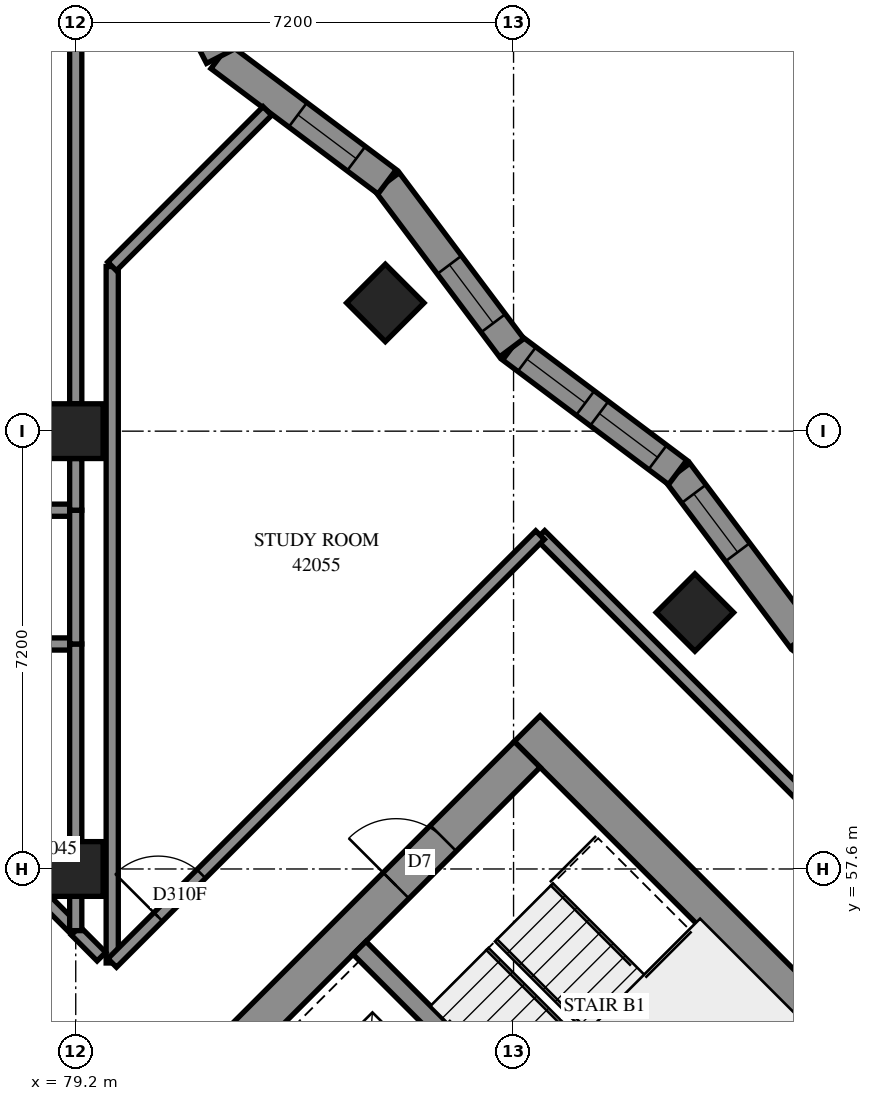
"""IFC4 building model, lengths in metres.
Left out: names, types, materials, properties, quantities, classifications, styles, units other than length and angle.
Written with IfcOpenShell. Run it as: python <this file> out.ifc"""

import sys

from ifc_helpers import new_model, si_unit, direction, frame, frame_2d, origin, origin_2d, place, context, subcontext, project, spatial, polyline, rectangle, outline, extrude, element, fill, save


model = new_model("IFC4")
c1 = context("Model", 3, precision=1e-05, world=origin(), true_north=direction((0.0, 1.0)))
c2 = subcontext(c1, "Body", "Model", "MODEL_VIEW")
j1 = project(units=[si_unit("LENGTHUNIT", "METRE"), si_unit("PLANEANGLEUNIT", "RADIAN")], contexts=[c1])
p1 = place(None, origin())
s1 = spatial("IfcSite", under=j1, at=p1, CompositionType="ELEMENT")
p2 = place(p1, origin())
s2 = spatial("IfcBuilding", under=s1, at=p2, CompositionType="ELEMENT")
p3 = place(p2, frame((0.0, 0.0, 155.8)))
s3 = spatial("IfcBuildingStorey", under=s2, at=p3, CompositionType="ELEMENT", Elevation=155.8)
for number, where, z_axis, x_axis in (
    (1, (79.2, 57.6, 0.0), (0.0, 0.0, 1.0), (1.0, 0.0, 0.0)),
    (2, (79.2, 64.8, 0.0), (0.0, 0.0, 1.0), (1.0, 0.0, 0.0)),
    (3, (84.291, 66.909, 0.0), (0.0, 0.0, 1.0), (0.707, -0.707, 0.0)),
    (4, (89.382, 61.818, 0.0), (0.0, 0.0, 1.0), (0.707, -0.707, 0.0)),
):
    element("IfcColumn", number, at=place(p3, frame(where, z_axis=z_axis, x_axis=x_axis)), inside=s3, PredefinedType="COLUMN", context=c2, shape_type="SweptSolid", body=[
        extrude(rectangle(XDim=0.9, YDim=0.9, at=origin_2d()), origin(), (0.0, 0.0, 1.0), 3.1),
    ])
p4 = place(p3, frame((86.625, 59.908, -0.3), z_axis=(0.0, 0.0, 1.0), x_axis=(0.7071067812, -0.7071067812, 0.0)))
e5 = element("IfcWall", 5, at=p4, inside=s3, PredefinedType="SHEAR", context=c2, shape_type="SweptSolid", body=[
    extrude(rectangle(XDim=15.6, YDim=0.6, at=frame_2d((7.8, 0.0))), origin(), (0.0, 0.0, 1.0), 2.7),
])
p5 = place(p4, frame((10.6, 0.0, 0.3)))
e6 = element("IfcOpeningElement", 6, at=p5, cuts=e5, PredefinedType="OPENING", context=c2, shape_type="SweptSolid", body=[
    extrude(rectangle(XDim=0.8, YDim=2.1, at=frame_2d((0.4, 1.05))), frame((0.0, 0.31, 0.0), z_axis=(0.0, -1.0, 0.0), x_axis=(1.0, 0.0, 0.0)), (0.0, 0.0, 1.0), 0.62),
])
p6 = place(p3, frame((76.442, 49.302, -0.3), z_axis=(0.0, 0.0, 1.0), x_axis=(0.7071067812, 0.7071067812, 0.0)))
e7 = element("IfcWall", 7, at=p6, inside=s3, PredefinedType="SHEAR", context=c2, shape_type="SweptSolid", body=[
    extrude(rectangle(XDim=14.4, YDim=0.6, at=frame_2d((7.2, 0.0))), origin(), (0.0, 0.0, 1.0), 2.7),
])
p7 = place(p6, frame((4.55, 0.0, 0.3)))
e8 = element("IfcOpeningElement", 8, at=p7, cuts=e7, PredefinedType="OPENING", context=c2, shape_type="SweptSolid", body=[
    extrude(rectangle(XDim=1.1, YDim=2.1, at=frame_2d((0.55, 1.05))), frame((0.0, 0.31, 0.0), z_axis=(0.0, -1.0, 0.0), x_axis=(1.0, 0.0, 0.0)), (0.0, 0.0, 1.0), 0.62),
])
p8 = place(p6, frame((11.35, 0.0, 0.3)))
e9 = element("IfcOpeningElement", 9, at=p8, cuts=e7, PredefinedType="OPENING", context=c2, shape_type="SweptSolid", body=[
    extrude(rectangle(XDim=1.1, YDim=2.1, at=frame_2d((0.55, 1.05))), frame((0.0, 0.31, 0.0), z_axis=(0.0, -1.0, 0.0), x_axis=(1.0, 0.0, 0.0)), (0.0, 0.0, 1.0), 0.62),
])
p9 = place(p3, frame((83.867, 56.302, 0.0), z_axis=(0.0, 0.0, 1.0), x_axis=(0.7071137256, -0.7070998367, 0.0)))
e10 = element("IfcWall", 10, at=p9, inside=s3, PredefinedType="SOLIDWALL", context=c2, shape_type="SweptSolid", body=[
    extrude(rectangle(XDim=7.2, YDim=0.3, at=frame_2d((3.6, 0.0))), origin(), (0.0, 0.0, 1.0), 3.1),
])
p10 = place(p3, frame((93.877, 59.344, 0.0), z_axis=(0.0, 0.0, 1.0), x_axis=(-0.7998874743, 0.600150005, 0.0)))
e11 = element("IfcWall", 11, at=p10, inside=s3, PredefinedType="SOLIDWALL", context=c2, shape_type="SweptSolid", body=[
    extrude(outline(polyline([(-0.036, -0.25), (3.377, -0.25), (3.449, 0.25), (0.036, 0.25), (-0.036, -0.25)])), origin(), (0.0, 0.0, 1.0), 3.1),
])
p11 = place(p10, frame((1.677, 0.0, 0.45)))
e12 = element("IfcOpeningElement", 12, at=p11, cuts=e11, PredefinedType="OPENING", context=c2, shape_type="SweptSolid", body=[
    extrude(rectangle(XDim=1.2, YDim=2.5, at=frame_2d((0.6, 1.25))), frame((0.0, 0.26, 0.0), z_axis=(0.0, -1.0, 0.0), x_axis=(1.0, 0.0, 0.0)), (0.0, 0.0, 1.0), 0.52),
])
p12 = place(p3, frame((91.147, 61.393, 0.0), z_axis=(0.0, 0.0, 1.0), x_axis=(-0.600150005, 0.7998874743, 0.0)))
e13 = element("IfcWall", 13, at=p12, inside=s3, PredefinedType="SOLIDWALL", context=c2, shape_type="SweptSolid", body=[
    extrude(outline(polyline([(0.036, -0.25), (3.449, -0.25), (3.377, 0.25), (-0.036, 0.25), (0.036, -0.25)])), origin(), (0.0, 0.0, 1.0), 3.1),
])
p13 = place(p12, frame((1.771, 0.0, 0.45)))
e14 = element("IfcOpeningElement", 14, at=p13, cuts=e13, PredefinedType="OPENING", context=c2, shape_type="SweptSolid", body=[
    extrude(rectangle(XDim=1.2, YDim=2.5, at=frame_2d((0.6, 1.25))), frame((0.0, 0.26, 0.0), z_axis=(0.0, -1.0, 0.0), x_axis=(1.0, 0.0, 0.0)), (0.0, 0.0, 1.0), 0.52),
])
p14 = place(p3, frame((89.099, 64.123, 0.0), z_axis=(0.0, 0.0, 1.0), x_axis=(-0.7998874743, 0.600150005, 0.0)))
e15 = element("IfcWall", 15, at=p14, inside=s3, PredefinedType="SOLIDWALL", context=c2, shape_type="SweptSolid", body=[
    extrude(outline(polyline([(-0.036, -0.25), (3.377, -0.25), (3.449, 0.25), (0.036, 0.25), (-0.036, -0.25)])), origin(), (0.0, 0.0, 1.0), 3.1),
])
p15 = place(p14, frame((0.412, 0.0, 0.45)))
e16 = element("IfcOpeningElement", 16, at=p15, cuts=e15, PredefinedType="OPENING", context=c2, shape_type="SweptSolid", body=[
    extrude(rectangle(XDim=1.2, YDim=2.5, at=frame_2d((0.6, 1.25))), frame((0.0, 0.26, 0.0), z_axis=(0.0, -1.0, 0.0), x_axis=(1.0, 0.0, 0.0)), (0.0, 0.0, 1.0), 0.52),
])
p16 = place(p14, frame((1.9, 0.0, 0.45)))
e17 = element("IfcOpeningElement", 17, at=p16, cuts=e15, PredefinedType="OPENING", context=c2, shape_type="SweptSolid", body=[
    extrude(rectangle(XDim=1.2, YDim=2.5, at=frame_2d((0.6, 1.25))), frame((0.0, 0.26, 0.0), z_axis=(0.0, -1.0, 0.0), x_axis=(1.0, 0.0, 0.0)), (0.0, 0.0, 1.0), 0.52),
])
p17 = place(p3, frame((86.369, 66.171, 0.0), z_axis=(0.0, 0.0, 1.0), x_axis=(-0.600150005, 0.7998874743, 0.0)))
e18 = element("IfcWall", 18, at=p17, inside=s3, PredefinedType="SOLIDWALL", context=c2, shape_type="SweptSolid", body=[
    extrude(outline(polyline([(0.036, -0.25), (3.449, -0.25), (3.377, 0.25), (-0.036, 0.25), (0.036, -0.25)])), origin(), (0.0, 0.0, 1.0), 3.1),
])
p18 = place(p17, frame((0.506, 0.0, 0.45)))
e19 = element("IfcOpeningElement", 19, at=p18, cuts=e18, PredefinedType="OPENING", context=c2, shape_type="SweptSolid", body=[
    extrude(rectangle(XDim=1.2, YDim=2.5, at=frame_2d((0.6, 1.25))), frame((0.0, 0.26, 0.0), z_axis=(0.0, -1.0, 0.0), x_axis=(1.0, 0.0, 0.0)), (0.0, 0.0, 1.0), 0.52),
])
p19 = place(p3, frame((84.321, 68.901, 0.0), z_axis=(0.0, 0.0, 1.0), x_axis=(-0.7998811987, 0.600158369, 0.0)))
e20 = element("IfcWall", 20, at=p19, inside=s3, PredefinedType="SOLIDWALL", context=c2, shape_type="SweptSolid", body=[
    extrude(outline(polyline([(-0.036, -0.25), (3.377, -0.25), (3.492, 0.25), (0.036, 0.25), (-0.036, -0.25)])), origin(), (0.0, 0.0, 1.0), 3.1),
])
p20 = place(p19, frame((0.635, 0.0, 0.45)))
e21 = element("IfcOpeningElement", 21, at=p20, cuts=e20, PredefinedType="OPENING", context=c2, shape_type="SweptSolid", body=[
    extrude(rectangle(XDim=1.2, YDim=2.5, at=frame_2d((0.6, 1.25))), frame((0.0, 0.26, 0.0), z_axis=(0.0, -1.0, 0.0), x_axis=(1.0, 0.0, 0.0)), (0.0, 0.0, 1.0), 0.52),
])
p21 = place(p3, frame((81.573, 70.962, 0.0), z_axis=(0.0, 0.0, 1.0), x_axis=(-0.4577692458, 0.8890710419, 0.0)))
e22 = element("IfcWall", 22, at=p21, inside=s3, PredefinedType="SOLIDWALL", context=c2, shape_type="SweptSolid", body=[
    extrude(outline(polyline([(0.057, -0.25), (3.605, -0.25), (3.196, 0.25), (-0.057, 0.25), (0.057, -0.25)])), origin(), (0.0, 0.0, 1.0), 3.1),
])
p22 = place(p21, frame((0.766, 0.0, 0.45)))
e23 = element("IfcOpeningElement", 23, at=p22, cuts=e22, PredefinedType="OPENING", context=c2, shape_type="SweptSolid", body=[
    extrude(rectangle(XDim=1.2, YDim=2.5, at=frame_2d((0.6, 1.25))), frame((0.0, 0.26, 0.0), z_axis=(0.0, -1.0, 0.0), x_axis=(1.0, 0.0, 0.0)), (0.0, 0.0, 1.0), 0.52),
])
p23 = place(p3, frame((86.841, 63.093, 0.0), z_axis=(0.0, 0.0, 1.0), x_axis=(0.7071067812, -0.7071067812, 0.0)))
e24 = element("IfcWall", 24, at=p23, inside=s3, PredefinedType="PARTITIONING", context=c2, shape_type="SweptSolid", body=[
    extrude(rectangle(XDim=12.239, YDim=0.2, at=frame_2d((6.119, 0.0))), origin(), (0.0, 0.0, 1.0), 3.1),
])
p24 = place(p23, frame((10.634, 0.0, 0.0)))
e25 = element("IfcOpeningElement", 25, at=p24, cuts=e24, PredefinedType="OPENING", context=c2, shape_type="SweptSolid", body=[
    extrude(rectangle(XDim=0.9, YDim=2.1, at=frame_2d((0.45, 1.05))), frame((0.0, 0.11, 0.0), z_axis=(0.0, -1.0, 0.0), x_axis=(1.0, 0.0, 0.0)), (0.0, 0.0, 1.0), 0.22),
])
p25 = place(p3, frame((79.8, 56.054, 0.0), z_axis=(0.0, 0.0, 1.0), x_axis=(0.0, 1.0, 0.0)))
e26 = element("IfcWall", 26, at=p25, inside=s3, PredefinedType="PARTITIONING", context=c2, shape_type="SweptSolid", body=[
    extrude(rectangle(XDim=11.454, YDim=0.2, at=frame_2d((5.727, 0.0))), origin(), (0.0, 0.0, 1.0), 3.1),
])
p26 = place(p3, frame((79.799, 56.055, 0.0), z_axis=(0.0, 0.0, 1.0), x_axis=(0.7071067812, 0.7071067812, 0.0)))
e27 = element("IfcWall", 27, at=p26, inside=s3, PredefinedType="PARTITIONING", context=c2, shape_type="SweptSolid", body=[
    extrude(rectangle(XDim=9.95, YDim=0.2, at=frame_2d((4.975, 0.0))), origin(), (0.0, 0.0, 1.0), 3.1),
])
p27 = place(p26, frame((1.071, 0.0, 0.0)))
e28 = element("IfcOpeningElement", 28, at=p27, cuts=e27, PredefinedType="OPENING", context=c2, shape_type="SweptSolid", body=[
    extrude(rectangle(XDim=1.0, YDim=2.1, at=frame_2d((0.5, 1.05))), frame((0.0, 0.11, 0.0), z_axis=(0.0, -1.0, 0.0), x_axis=(1.0, 0.0, 0.0)), (0.0, 0.0, 1.0), 0.22),
])
p28 = place(p3, frame((79.2, 65.25, 0.0), z_axis=(0.0, 0.0, 1.0), x_axis=(0.0, 1.0, 0.0)))
e29 = element("IfcWall", 29, at=p28, inside=s3, PredefinedType="PARTITIONING", context=c2, shape_type="SweptSolid", body=[
    extrude(rectangle(XDim=6.3, YDim=0.2, at=frame_2d((3.15, 0.0))), origin(), (0.0, 0.0, 1.0), 3.1),
])
p29 = place(p3, frame((74.903, 60.889, 0.0), z_axis=(0.0, 0.0, 1.0), x_axis=(0.7071067812, -0.7071067812, 0.0)))
e30 = element("IfcWall", 30, at=p29, inside=s3, PredefinedType="PARTITIONING", context=c2, shape_type="SweptSolid", body=[
    extrude(rectangle(XDim=6.081, YDim=0.2, at=frame_2d((3.041, 0.0))), origin(), (0.0, 0.0, 1.0), 3.1),
])
p30 = place(p3, frame((74.488, 61.3, 0.0), z_axis=(0.0, 0.0, 1.0), x_axis=(1.0, 0.0, 0.0)))
e31 = element("IfcWall", 31, at=p30, inside=s3, PredefinedType="PARTITIONING", context=c2, shape_type="SweptSolid", body=[
    extrude(rectangle(XDim=4.712, YDim=0.2, at=frame_2d((2.356, 0.0))), origin(), (0.0, 0.0, 1.0), 3.1),
])
p31 = place(p30, frame((1.037, 0.0, 0.0)))
e32 = element("IfcOpeningElement", 32, at=p31, cuts=e31, PredefinedType="OPENING", context=c2, shape_type="SweptSolid", body=[
    extrude(rectangle(XDim=1.0, YDim=2.1, at=frame_2d((0.5, 1.05))), frame((0.0, 0.11, 0.0), z_axis=(0.0, -1.0, 0.0), x_axis=(1.0, 0.0, 0.0)), (0.0, 0.0, 1.0), 0.22),
])
p32 = place(p3, frame((74.702, 63.5, 0.0), z_axis=(0.0, 0.0, 1.0), x_axis=(1.0, 0.0, 0.0)))
e33 = element("IfcWall", 33, at=p32, inside=s3, PredefinedType="PARTITIONING", context=c2, shape_type="SweptSolid", body=[
    extrude(rectangle(XDim=4.498, YDim=0.2, at=frame_2d((2.249, 0.0))), origin(), (0.0, 0.0, 1.0), 3.1),
])
p33 = place(p32, frame((3.046, 0.0, 0.0)))
e34 = element("IfcOpeningElement", 34, at=p33, cuts=e33, PredefinedType="OPENING", context=c2, shape_type="SweptSolid", body=[
    extrude(rectangle(XDim=0.9, YDim=2.1, at=frame_2d((0.45, 1.05))), frame((0.0, 0.11, 0.0), z_axis=(0.0, -1.0, 0.0), x_axis=(1.0, 0.0, 0.0)), (0.0, 0.0, 1.0), 0.22),
])
p34 = place(p3, frame((79.797, 67.51, 0.0), z_axis=(0.0, 0.0, 1.0), x_axis=(0.7068437799, 0.7073696847, 0.0)))
e35 = element("IfcWall", 35, at=p34, inside=s3, PredefinedType="PARTITIONING", context=c2, shape_type="SweptSolid", body=[
    extrude(rectangle(XDim=3.613, YDim=0.2, at=frame_2d((1.806, 0.0))), origin(), (0.0, 0.0, 1.0), 3.1),
])
p35 = place(p3, frame((79.2, 58.05, 0.0), z_axis=(0.0, 0.0, 1.0), x_axis=(0.0, 1.0, 0.0)))
e36 = element("IfcWall", 36, at=p35, inside=s3, PredefinedType="PARTITIONING", context=c2, shape_type="SweptSolid", body=[
    extrude(rectangle(XDim=3.25, YDim=0.2, at=frame_2d((1.625, 0.0))), origin(), (0.0, 0.0, 1.0), 3.1),
])
p36 = place(p3, frame((79.2, 61.3, 0.0), z_axis=(0.0, 0.0, 1.0), x_axis=(0.0, 1.0, 0.0)))
e37 = element("IfcWall", 37, at=p36, inside=s3, PredefinedType="PARTITIONING", context=c2, shape_type="SweptSolid", body=[
    extrude(rectangle(XDim=2.2, YDim=0.2, at=frame_2d((1.1, 0.0))), origin(), (0.0, 0.0, 1.0), 3.1),
])
p37 = place(p3, frame((79.2, 63.5, 0.0), z_axis=(0.0, 0.0, 1.0), x_axis=(0.0, 1.0, 0.0)))
e38 = element("IfcWall", 38, at=p37, inside=s3, PredefinedType="PARTITIONING", context=c2, shape_type="SweptSolid", body=[
    extrude(rectangle(XDim=0.85, YDim=0.2, at=frame_2d((0.425, 0.0))), origin(), (0.0, 0.0, 1.0), 3.1),
])
p38 = place(p3, frame((79.198, 56.584, 0.0), z_axis=(0.0, 0.0, 1.0), x_axis=(0.7054410477, -0.7087685999, 0.0)))
e39 = element("IfcWall", 39, at=p38, inside=s3, PredefinedType="PARTITIONING", context=c2, shape_type="SweptSolid", body=[
    extrude(rectangle(XDim=0.601, YDim=0.2, at=frame_2d((0.3, 0.0))), origin(), (0.0, 0.0, 1.0), 3.1),
])
p39 = place(p3, frame((79.2, 56.586, 0.0), z_axis=(0.0, 0.0, 1.0), x_axis=(0.0, 1.0, 0.0)))
e40 = element("IfcWall", 40, at=p39, inside=s3, PredefinedType="PARTITIONING", context=c2, shape_type="SweptSolid", body=[
    extrude(rectangle(XDim=0.564, YDim=0.2, at=frame_2d((0.282, 0.0))), origin(), (0.0, 0.0, 1.0), 3.1),
])
p40 = place(p13, origin())
e41 = element("IfcWindow", 41, at=p40, inside=s3, PartitioningType="SINGLE_PANEL", PredefinedType="WINDOW", context=c2, shape_type="SweptSolid", body=[
    extrude(rectangle(XDim=1.2, YDim=2.5, at=frame_2d((0.6, 1.25))), frame((0.0, 0.18, 0.0), z_axis=(0.0, -1.0, 0.0), x_axis=(1.0, 0.0, 0.0)), (0.0, 0.0, 1.0), 0.06),
])
fill(e14, e41)
p41 = place(p15, origin())
e42 = element("IfcWindow", 42, at=p41, inside=s3, PartitioningType="SINGLE_PANEL", PredefinedType="WINDOW", context=c2, shape_type="SweptSolid", body=[
    extrude(rectangle(XDim=1.2, YDim=2.5, at=frame_2d((0.6, 1.25))), frame((0.0, 0.18, 0.0), z_axis=(0.0, -1.0, 0.0), x_axis=(1.0, 0.0, 0.0)), (0.0, 0.0, 1.0), 0.06),
])
fill(e16, e42)
p42 = place(p16, origin())
e43 = element("IfcWindow", 43, at=p42, inside=s3, PartitioningType="SINGLE_PANEL", PredefinedType="WINDOW", context=c2, shape_type="SweptSolid", body=[
    extrude(rectangle(XDim=1.2, YDim=2.5, at=frame_2d((0.6, 1.25))), frame((0.0, 0.18, 0.0), z_axis=(0.0, -1.0, 0.0), x_axis=(1.0, 0.0, 0.0)), (0.0, 0.0, 1.0), 0.06),
])
fill(e17, e43)
p43 = place(p18, origin())
e44 = element("IfcWindow", 44, at=p43, inside=s3, PartitioningType="SINGLE_PANEL", PredefinedType="WINDOW", context=c2, shape_type="SweptSolid", body=[
    extrude(rectangle(XDim=1.2, YDim=2.5, at=frame_2d((0.6, 1.25))), frame((0.0, 0.18, 0.0), z_axis=(0.0, -1.0, 0.0), x_axis=(1.0, 0.0, 0.0)), (0.0, 0.0, 1.0), 0.06),
])
fill(e19, e44)
p44 = place(p20, origin())
e45 = element("IfcWindow", 45, at=p44, inside=s3, PartitioningType="SINGLE_PANEL", PredefinedType="WINDOW", context=c2, shape_type="SweptSolid", body=[
    extrude(rectangle(XDim=1.2, YDim=2.5, at=frame_2d((0.6, 1.25))), frame((0.0, 0.18, 0.0), z_axis=(0.0, -1.0, 0.0), x_axis=(1.0, 0.0, 0.0)), (0.0, 0.0, 1.0), 0.06),
])
fill(e21, e45)
p45 = place(p8, origin())
e46 = element("IfcDoor", 46, at=p45, inside=s3, OperationType="SINGLE_SWING_LEFT", PredefinedType="DOOR", context=c2, shape_type="SweptSolid", body=[
    extrude(rectangle(XDim=1.1, YDim=2.1, at=frame_2d((0.55, 1.05))), frame((0.0, 0.025, 0.0), z_axis=(0.0, -1.0, 0.0), x_axis=(1.0, 0.0, 0.0)), (0.0, 0.0, 1.0), 0.05),
])
fill(e9, e46)
p46 = place(p27, origin())
e47 = element("IfcDoor", 47, at=p46, inside=s3, OperationType="SINGLE_SWING_RIGHT", PredefinedType="DOOR", context=c2, shape_type="SweptSolid", body=[
    extrude(rectangle(XDim=1.0, YDim=2.1, at=frame_2d((0.5, 1.05))), frame((0.0, 0.025, 0.0), z_axis=(0.0, -1.0, 0.0), x_axis=(1.0, 0.0, 0.0)), (0.0, 0.0, 1.0), 0.05),
])
fill(e28, e47)
save(model, sys.argv[1])
